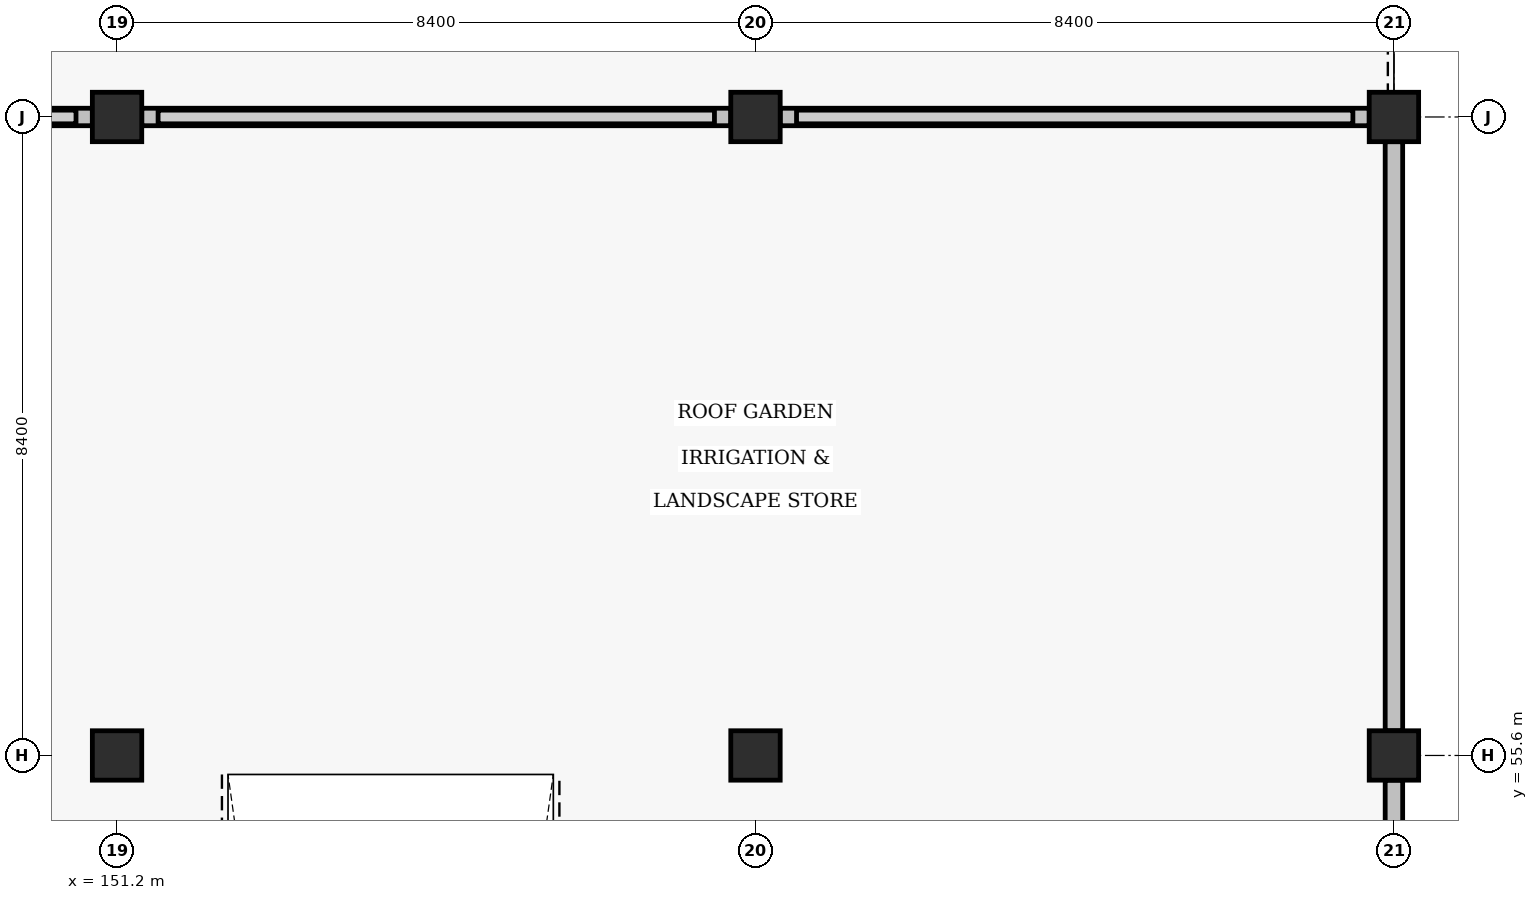
"""IFC4 building model, lengths in metres.
Left out: names, types, materials, properties, quantities, classifications, styles, units other than length and angle.
Written with IfcOpenShell. Run it as: python <this file> out.ifc"""

import sys

from ifc_helpers import new_model, si_unit, direction, frame, frame_2d, origin, origin_2d, place, context, subcontext, project, spatial, rectangle, extrude, element, save


model = new_model("IFC4")
c1 = context("Model", 3, precision=1e-05, world=origin(), true_north=direction((0.0, 1.0)))
c2 = subcontext(c1, "Body", "Model", "MODEL_VIEW")
j1 = project(units=[si_unit("LENGTHUNIT", "METRE"), si_unit("PLANEANGLEUNIT", "RADIAN")], contexts=[c1])
p1 = place(None, origin())
s1 = spatial("IfcSite", under=j1, at=p1, CompositionType="ELEMENT")
p2 = place(p1, origin())
s2 = spatial("IfcBuilding", under=s1, at=p2, CompositionType="ELEMENT")
p3 = place(p2, frame((0.0, 0.0, 13.12)))
s3 = spatial("IfcBuildingStorey", under=s2, at=p3, CompositionType="ELEMENT", Elevation=13.12)
for number, where, z_axis, x_axis in (
    (1, (151.2, 55.6, 0.0), (0.0, 0.0, 1.0), (1.0, 0.0, 0.0)),
    (2, (151.2, 64.0, 0.0), (0.0, 0.0, 1.0), (1.0, 0.0, 0.0)),
    (3, (159.6, 55.6, 0.0), (0.0, 0.0, 1.0), (1.0, 0.0, 0.0)),
    (4, (159.6, 64.0, 0.0), (0.0, 0.0, 1.0), (1.0, 0.0, 0.0)),
    (5, (168.0, 55.6, 0.0), (0.0, 0.0, 1.0), (1.0, 0.0, 0.0)),
    (6, (168.0, 64.0, 0.0), (0.0, 0.0, 1.0), (1.0, 0.0, 0.0)),
):
    element("IfcColumn", number, at=place(p3, frame(where, z_axis=z_axis, x_axis=x_axis)), inside=s3, PredefinedType="COLUMN", context=c2, shape_type="SweptSolid", body=[
        extrude(rectangle(XDim=0.65, YDim=0.65, at=origin_2d()), origin(), (0.0, 0.0, 1.0), 3.2),
    ])
for number, where, z_axis, x_axis in (
    (7, (143.125, 64.0, 0.0), (0.0, 0.0, 1.0), (1.0, 0.0, 0.0)),
    (8, (151.525, 64.0, 0.0), (0.0, 0.0, 1.0), (1.0, 0.0, 0.0)),
    (9, (159.925, 64.0, 0.0), (0.0, 0.0, 1.0), (1.0, 0.0, 0.0)),
    (10, (168.0, 47.525, 0.0), (0.0, 0.0, 1.0), (0.0, 1.0, 0.0)),
    (11, (168.0, 55.925, 0.0), (0.0, 0.0, 1.0), (0.0, 1.0, 0.0)),
):
    element("IfcWall", number, at=place(p3, frame(where, z_axis=z_axis, x_axis=x_axis)), inside=s3, PredefinedType="PARAPET", context=c2, shape_type="SweptSolid", body=[
        extrude(rectangle(XDim=7.75, YDim=0.23, at=frame_2d((3.875, 0.0))), origin(), (0.0, 0.0, 1.0), 1.15),
    ])
save(model, sys.argv[1])
